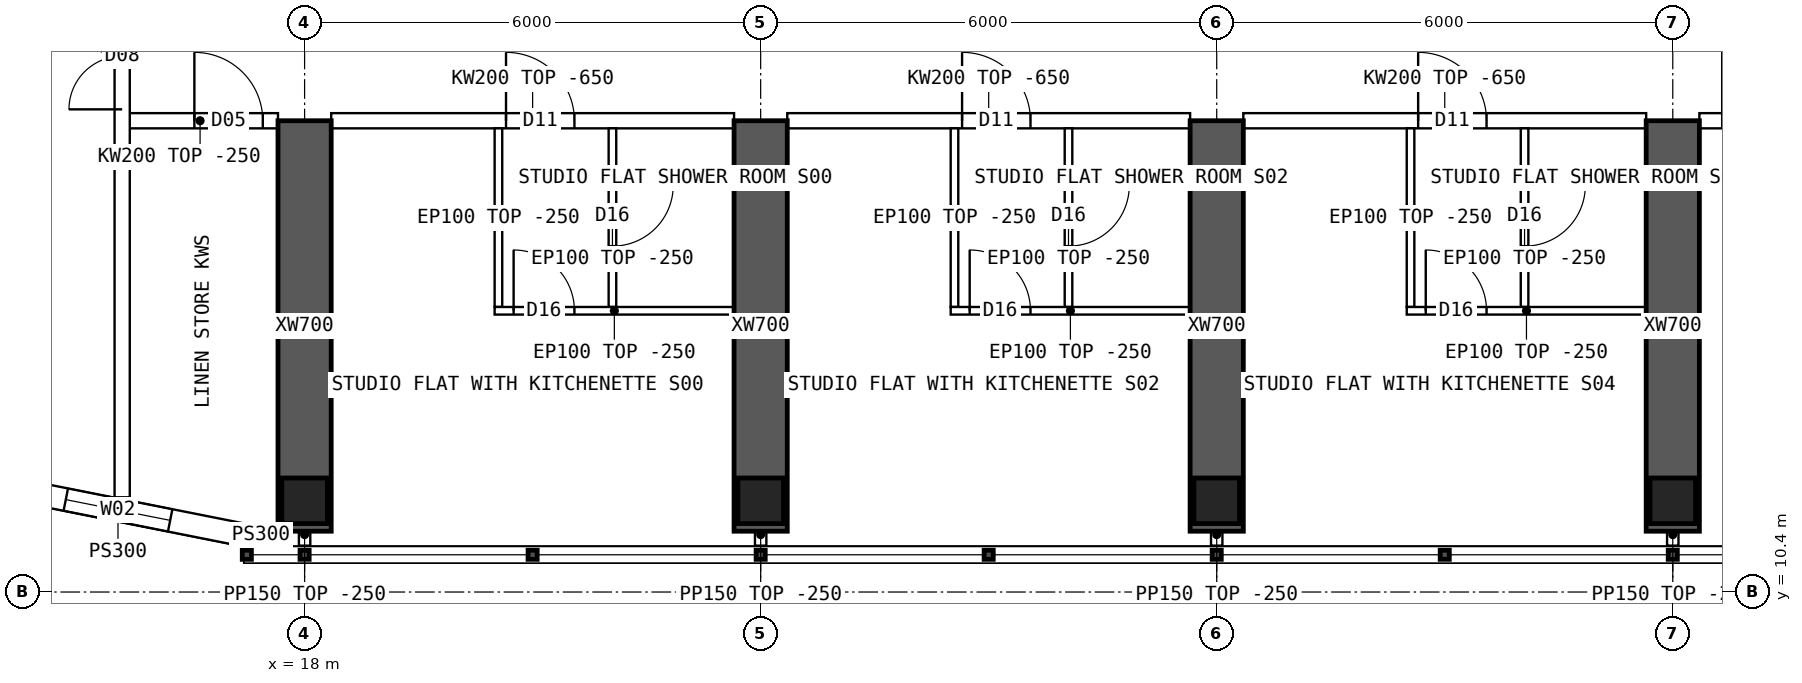
"""IFC4 building model, lengths in metres.
Left out: names, types, materials, properties, quantities, classifications, styles, units other than length and angle.
Written with IfcOpenShell. Run it as: python <this file> out.ifc"""

import sys

from ifc_helpers import new_model, si_unit, direction, frame, frame_2d, origin, origin_2d, place, context, subcontext, project, spatial, polyline, rectangle, hollow_rectangle, outline, extrude, element, fill, save


model = new_model("IFC4")
c1 = context("Model", 3, precision=1e-05, world=origin(), true_north=direction((0.0, 1.0)))
c2 = subcontext(c1, "Body", "Model", "MODEL_VIEW")
j1 = project(units=[si_unit("LENGTHUNIT", "METRE"), si_unit("PLANEANGLEUNIT", "RADIAN")], contexts=[c1])
p1 = place(None, origin())
s1 = spatial("IfcSite", under=j1, at=p1, CompositionType="ELEMENT")
p2 = place(p1, origin())
s2 = spatial("IfcBuilding", under=s1, at=p2, CompositionType="ELEMENT")
p3 = place(p2, frame((0.0, 0.0, 246.55)))
s3 = spatial("IfcBuildingStorey", under=s2, at=p3, CompositionType="ELEMENT", Elevation=246.55)
for number, where, z_axis, x_axis in (
    (1, (18.0, 11.6, 0.0), (0.0, 0.0, 1.0), (1.0, 0.0, 0.0)),
    (2, (24.0, 11.6, 0.0), (0.0, 0.0, 1.0), (1.0, 0.0, 0.0)),
    (3, (30.0, 11.6, 0.0), (0.0, 0.0, 1.0), (1.0, 0.0, 0.0)),
    (4, (36.0, 11.6, 0.0), (0.0, 0.0, 1.0), (1.0, 0.0, 0.0)),
):
    element("IfcColumn", number, at=place(p3, frame(where, z_axis=z_axis, x_axis=x_axis)), inside=s3, PredefinedType="COLUMN", context=c2, shape_type="SweptSolid", body=[
        extrude(hollow_rectangle(XDim=0.6, YDim=0.6, WallThickness=0.06, at=origin_2d()), origin(), (0.0, 0.0, 1.0), 3.75),
    ])
for number, where, z_axis, x_axis in (
    (5, (18.0, 11.2, 0.0), (0.0, 0.0, 1.0), (0.0, 1.0, 0.0)),
    (6, (24.0, 11.2, 0.0), (0.0, 0.0, 1.0), (0.0, 1.0, 0.0)),
    (7, (30.0, 11.2, 0.0), (0.0, 0.0, 1.0), (0.0, 1.0, 0.0)),
    (8, (36.0, 11.2, 0.0), (0.0, 0.0, 1.0), (0.0, 1.0, 0.0)),
):
    element("IfcWall", number, at=place(p3, frame(where, z_axis=z_axis, x_axis=x_axis)), inside=s3, PredefinedType="SHEAR", context=c2, shape_type="SweptSolid", body=[
        extrude(rectangle(XDim=5.4, YDim=0.7, at=frame_2d((2.7, 0.0))), origin(), (0.0, 0.0, 1.0), 3.75),
    ])
p4 = place(p3, frame((13.89, 11.808, 0.0), z_axis=(0.0, 0.0, 1.0), x_axis=(0.98078325777, -0.195100490205, 0.0)))
e9 = element("IfcWall", 9, at=p4, inside=s3, PredefinedType="SOLIDWALL", context=c2, shape_type="SweptSolid", body=[
    extrude(outline(polyline([(-0.03, -0.15), (3.405, -0.15), (3.345, 0.15), (0.03, 0.15), (-0.03, -0.15)])), origin(), (0.0, 0.0, 1.0), 3.5),
])
p5 = place(p4, frame((0.988, 0.0, 0.9)))
e10 = element("IfcOpeningElement", 10, at=p5, cuts=e9, PredefinedType="OPENING", context=c2, shape_type="SweptSolid", body=[
    extrude(rectangle(XDim=1.4, YDim=1.8, at=frame_2d((0.7, 0.9))), frame((0.0, 0.16, 0.0), z_axis=(0.0, -1.0, 0.0), x_axis=(1.0, 0.0, 0.0)), (0.0, 0.0, 1.0), 0.32),
])
p6 = place(p3, frame((17.2, 11.15, 0.0), z_axis=(0.0, 0.0, 1.0), x_axis=(1.0, 0.0, 0.0)))
e11 = element("IfcWall", 11, at=p6, inside=s3, PredefinedType="SOLIDWALL", context=c2, shape_type="SweptSolid", body=[
    extrude(rectangle(XDim=0.45, YDim=0.3, at=frame_2d((0.225, 0.0))), origin(), (0.0, 0.0, 1.0), 3.5),
])
p7 = place(p3, frame((15.6, 16.6, 0.0), z_axis=(0.0, 0.0, 1.0), x_axis=(1.0, 0.0, 0.0)))
e12 = element("IfcWall", 12, at=p7, inside=s3, PredefinedType="SOLIDWALL", context=c2, shape_type="SweptSolid", body=[
    extrude(rectangle(XDim=2.05, YDim=0.2, at=frame_2d((1.025, 0.0))), origin(), (0.0, 0.0, 1.0), 3.5),
])
p8 = place(p7, frame((0.95, 0.0, 0.0)))
e13 = element("IfcOpeningElement", 13, at=p8, cuts=e12, PredefinedType="OPENING", context=c2, shape_type="SweptSolid", body=[
    extrude(rectangle(XDim=0.9, YDim=2.1, at=frame_2d((0.45, 1.05))), frame((0.0, 0.11, 0.0), z_axis=(0.0, -1.0, 0.0), x_axis=(1.0, 0.0, 0.0)), (0.0, 0.0, 1.0), 0.22),
])
p9 = place(p3, frame((18.35, 16.6, 0.0), z_axis=(0.0, 0.0, 1.0), x_axis=(1.0, 0.0, 0.0)))
e14 = element("IfcWall", 14, at=p9, inside=s3, PredefinedType="SOLIDWALL", context=c2, shape_type="SweptSolid", body=[
    extrude(outline(polyline([(0.0, 0.0), (5.3, 0.0), (5.3, 3.1), (0.0, 3.1), (0.0, 0.0)])), frame((0.0, 0.1, 0.0), z_axis=(0.0, -1.0, 0.0), x_axis=(1.0, 0.0, 0.0)), (0.0, 0.0, 1.0), 0.2),
])
p10 = place(p9, frame((2.3, 0.0, 0.0)))
e15 = element("IfcOpeningElement", 15, at=p10, cuts=e14, PredefinedType="OPENING", context=c2, shape_type="SweptSolid", body=[
    extrude(rectangle(XDim=0.9, YDim=2.1, at=frame_2d((0.45, 1.05))), frame((0.0, 0.11, 0.0), z_axis=(0.0, -1.0, 0.0), x_axis=(1.0, 0.0, 0.0)), (0.0, 0.0, 1.0), 0.22),
])
p11 = place(p3, frame((24.35, 16.6, 0.0), z_axis=(0.0, 0.0, 1.0), x_axis=(1.0, 0.0, 0.0)))
e16 = element("IfcWall", 16, at=p11, inside=s3, PredefinedType="SOLIDWALL", context=c2, shape_type="SweptSolid", body=[
    extrude(outline(polyline([(0.0, 0.0), (5.3, 0.0), (5.3, 3.1), (0.0, 3.1), (0.0, 0.0)])), frame((0.0, 0.1, 0.0), z_axis=(0.0, -1.0, 0.0), x_axis=(1.0, 0.0, 0.0)), (0.0, 0.0, 1.0), 0.2),
])
p12 = place(p11, frame((2.3, 0.0, 0.0)))
e17 = element("IfcOpeningElement", 17, at=p12, cuts=e16, PredefinedType="OPENING", context=c2, shape_type="SweptSolid", body=[
    extrude(rectangle(XDim=0.9, YDim=2.1, at=frame_2d((0.45, 1.05))), frame((0.0, 0.11, 0.0), z_axis=(0.0, -1.0, 0.0), x_axis=(1.0, 0.0, 0.0)), (0.0, 0.0, 1.0), 0.22),
])
p13 = place(p3, frame((30.35, 16.6, 0.0), z_axis=(0.0, 0.0, 1.0), x_axis=(1.0, 0.0, 0.0)))
e18 = element("IfcWall", 18, at=p13, inside=s3, PredefinedType="SOLIDWALL", context=c2, shape_type="SweptSolid", body=[
    extrude(outline(polyline([(0.0, 0.0), (5.3, 0.0), (5.3, 3.1), (0.0, 3.1), (0.0, 0.0)])), frame((0.0, 0.1, 0.0), z_axis=(0.0, -1.0, 0.0), x_axis=(1.0, 0.0, 0.0)), (0.0, 0.0, 1.0), 0.2),
])
p14 = place(p13, frame((2.3, 0.0, 0.0)))
e19 = element("IfcOpeningElement", 19, at=p14, cuts=e18, PredefinedType="OPENING", context=c2, shape_type="SweptSolid", body=[
    extrude(rectangle(XDim=0.9, YDim=2.1, at=frame_2d((0.45, 1.05))), frame((0.0, 0.11, 0.0), z_axis=(0.0, -1.0, 0.0), x_axis=(1.0, 0.0, 0.0)), (0.0, 0.0, 1.0), 0.22),
])
p15 = place(p3, frame((36.35, 16.6, 0.0), z_axis=(0.0, 0.0, 1.0), x_axis=(1.0, 0.0, 0.0)))
e20 = element("IfcWall", 20, at=p15, inside=s3, PredefinedType="SOLIDWALL", context=c2, shape_type="SweptSolid", body=[
    extrude(outline(polyline([(0.0, 0.0), (5.3, 0.0), (5.3, 3.1), (0.0, 3.1), (0.0, 0.0)])), frame((0.0, 0.1, 0.0), z_axis=(0.0, -1.0, 0.0), x_axis=(1.0, 0.0, 0.0)), (0.0, 0.0, 1.0), 0.2),
])
p16 = place(p15, frame((0.3, 0.0, 0.0)))
e21 = element("IfcOpeningElement", 21, at=p16, cuts=e20, PredefinedType="OPENING", context=c2, shape_type="SweptSolid", body=[
    extrude(rectangle(XDim=1.0, YDim=2.1, at=frame_2d((0.5, 1.05))), frame((0.0, 0.11, 0.0), z_axis=(0.0, -1.0, 0.0), x_axis=(1.0, 0.0, 0.0)), (0.0, 0.0, 1.0), 0.22),
])
p17 = place(p3, frame((23.65, 14.1, 0.0), z_axis=(0.0, 0.0, 1.0), x_axis=(-1.0, 0.0, 0.0)))
e22 = element("IfcWall", 22, at=p17, inside=s3, PredefinedType="PARTITIONING", context=c2, shape_type="SweptSolid", body=[
    extrude(rectangle(XDim=3.15, YDim=0.1, at=frame_2d((1.575, 0.0))), origin(), (0.0, 0.0, 1.0), 3.5),
])
p18 = place(p17, frame((2.1, 0.0, 0.0)))
e23 = element("IfcOpeningElement", 23, at=p18, cuts=e22, PredefinedType="OPENING", context=c2, shape_type="SweptSolid", body=[
    extrude(rectangle(XDim=0.8, YDim=2.1, at=frame_2d((0.4, 1.05))), frame((0.0, 0.06, 0.0), z_axis=(0.0, -1.0, 0.0), x_axis=(1.0, 0.0, 0.0)), (0.0, 0.0, 1.0), 0.12),
])
p19 = place(p3, frame((20.55, 14.15, 0.0), z_axis=(0.0, 0.0, 1.0), x_axis=(0.0, 1.0, 0.0)))
e24 = element("IfcWall", 24, at=p19, inside=s3, PredefinedType="PARTITIONING", context=c2, shape_type="SweptSolid", body=[
    extrude(outline(polyline([(0.0, 0.0), (2.35, 0.0), (2.35, 3.1), (2.302, 3.1), (2.3, 3.5), (0.0, 3.5), (0.0, 0.0)])), frame((0.0, 0.05, 0.0), z_axis=(0.0, -1.0, 0.0), x_axis=(1.0, 0.0, 0.0)), (0.0, 0.0, 1.0), 0.1),
])
p20 = place(p3, frame((22.05, 14.15, 0.0), z_axis=(0.0, 0.0, 1.0), x_axis=(0.0, 1.0, 0.0)))
e25 = element("IfcWall", 25, at=p20, inside=s3, PredefinedType="PARTITIONING", context=c2, shape_type="SweptSolid", body=[
    extrude(outline(polyline([(0.0, 0.0), (2.35, 0.0), (2.35, 3.1), (2.302, 3.1), (2.3, 3.5), (0.0, 3.5), (0.0, 0.0)])), frame((0.0, 0.05, 0.0), z_axis=(0.0, -1.0, 0.0), x_axis=(1.0, 0.0, 0.0)), (0.0, 0.0, 1.0), 0.1),
])
p21 = place(p20, frame((0.8, 0.0, 0.0)))
e26 = element("IfcOpeningElement", 26, at=p21, cuts=e25, PredefinedType="OPENING", context=c2, shape_type="SweptSolid", body=[
    extrude(rectangle(XDim=0.8, YDim=2.1, at=frame_2d((0.4, 1.05))), frame((0.0, 0.06, 0.0), z_axis=(0.0, -1.0, 0.0), x_axis=(1.0, 0.0, 0.0)), (0.0, 0.0, 1.0), 0.12),
])
p22 = place(p3, frame((29.65, 14.1, 0.0), z_axis=(0.0, 0.0, 1.0), x_axis=(-1.0, 0.0, 0.0)))
e27 = element("IfcWall", 27, at=p22, inside=s3, PredefinedType="PARTITIONING", context=c2, shape_type="SweptSolid", body=[
    extrude(rectangle(XDim=3.15, YDim=0.1, at=frame_2d((1.575, 0.0))), origin(), (0.0, 0.0, 1.0), 3.5),
])
p23 = place(p22, frame((2.1, 0.0, 0.0)))
e28 = element("IfcOpeningElement", 28, at=p23, cuts=e27, PredefinedType="OPENING", context=c2, shape_type="SweptSolid", body=[
    extrude(rectangle(XDim=0.8, YDim=2.1, at=frame_2d((0.4, 1.05))), frame((0.0, 0.06, 0.0), z_axis=(0.0, -1.0, 0.0), x_axis=(1.0, 0.0, 0.0)), (0.0, 0.0, 1.0), 0.12),
])
p24 = place(p3, frame((26.55, 14.15, 0.0), z_axis=(0.0, 0.0, 1.0), x_axis=(0.0, 1.0, 0.0)))
e29 = element("IfcWall", 29, at=p24, inside=s3, PredefinedType="PARTITIONING", context=c2, shape_type="SweptSolid", body=[
    extrude(outline(polyline([(0.0, 0.0), (2.35, 0.0), (2.35, 3.1), (2.302, 3.1), (2.3, 3.5), (0.0, 3.5), (0.0, 0.0)])), frame((0.0, 0.05, 0.0), z_axis=(0.0, -1.0, 0.0), x_axis=(1.0, 0.0, 0.0)), (0.0, 0.0, 1.0), 0.1),
])
p25 = place(p3, frame((28.05, 14.15, 0.0), z_axis=(0.0, 0.0, 1.0), x_axis=(0.0, 1.0, 0.0)))
e30 = element("IfcWall", 30, at=p25, inside=s3, PredefinedType="PARTITIONING", context=c2, shape_type="SweptSolid", body=[
    extrude(outline(polyline([(0.0, 0.0), (2.35, 0.0), (2.35, 3.1), (2.302, 3.1), (2.3, 3.5), (0.0, 3.5), (0.0, 0.0)])), frame((0.0, 0.05, 0.0), z_axis=(0.0, -1.0, 0.0), x_axis=(1.0, 0.0, 0.0)), (0.0, 0.0, 1.0), 0.1),
])
p26 = place(p25, frame((0.8, 0.0, 0.0)))
e31 = element("IfcOpeningElement", 31, at=p26, cuts=e30, PredefinedType="OPENING", context=c2, shape_type="SweptSolid", body=[
    extrude(rectangle(XDim=0.8, YDim=2.1, at=frame_2d((0.4, 1.05))), frame((0.0, 0.06, 0.0), z_axis=(0.0, -1.0, 0.0), x_axis=(1.0, 0.0, 0.0)), (0.0, 0.0, 1.0), 0.12),
])
p27 = place(p3, frame((35.65, 14.1, 0.0), z_axis=(0.0, 0.0, 1.0), x_axis=(-1.0, 0.0, 0.0)))
e32 = element("IfcWall", 32, at=p27, inside=s3, PredefinedType="PARTITIONING", context=c2, shape_type="SweptSolid", body=[
    extrude(rectangle(XDim=3.15, YDim=0.1, at=frame_2d((1.575, 0.0))), origin(), (0.0, 0.0, 1.0), 3.5),
])
p28 = place(p27, frame((2.1, 0.0, 0.0)))
e33 = element("IfcOpeningElement", 33, at=p28, cuts=e32, PredefinedType="OPENING", context=c2, shape_type="SweptSolid", body=[
    extrude(rectangle(XDim=0.8, YDim=2.1, at=frame_2d((0.4, 1.05))), frame((0.0, 0.06, 0.0), z_axis=(0.0, -1.0, 0.0), x_axis=(1.0, 0.0, 0.0)), (0.0, 0.0, 1.0), 0.12),
])
p29 = place(p3, frame((32.55, 14.15, 0.0), z_axis=(0.0, 0.0, 1.0), x_axis=(0.0, 1.0, 0.0)))
e34 = element("IfcWall", 34, at=p29, inside=s3, PredefinedType="PARTITIONING", context=c2, shape_type="SweptSolid", body=[
    extrude(outline(polyline([(0.0, 0.0), (2.35, 0.0), (2.35, 3.1), (2.302, 3.1), (2.3, 3.5), (0.0, 3.5), (0.0, 0.0)])), frame((0.0, 0.05, 0.0), z_axis=(0.0, -1.0, 0.0), x_axis=(1.0, 0.0, 0.0)), (0.0, 0.0, 1.0), 0.1),
])
p30 = place(p3, frame((34.05, 14.15, 0.0), z_axis=(0.0, 0.0, 1.0), x_axis=(0.0, 1.0, 0.0)))
e35 = element("IfcWall", 35, at=p30, inside=s3, PredefinedType="PARTITIONING", context=c2, shape_type="SweptSolid", body=[
    extrude(outline(polyline([(0.0, 0.0), (2.35, 0.0), (2.35, 3.1), (2.302, 3.1), (2.3, 3.5), (0.0, 3.5), (0.0, 0.0)])), frame((0.0, 0.05, 0.0), z_axis=(0.0, -1.0, 0.0), x_axis=(1.0, 0.0, 0.0)), (0.0, 0.0, 1.0), 0.1),
])
p31 = place(p30, frame((0.8, 0.0, 0.0)))
e36 = element("IfcOpeningElement", 36, at=p31, cuts=e35, PredefinedType="OPENING", context=c2, shape_type="SweptSolid", body=[
    extrude(rectangle(XDim=0.8, YDim=2.1, at=frame_2d((0.4, 1.05))), frame((0.0, 0.06, 0.0), z_axis=(0.0, -1.0, 0.0), x_axis=(1.0, 0.0, 0.0)), (0.0, 0.0, 1.0), 0.12),
])
p32 = place(p3, frame((15.6, 11.646, 0.0), z_axis=(0.0, 0.0, 1.0), x_axis=(0.0, 1.0, 0.0)))
e37 = element("IfcWall", 37, at=p32, inside=s3, PredefinedType="SOLIDWALL", context=c2, shape_type="SweptSolid", body=[
    extrude(rectangle(XDim=40.708, YDim=0.2, at=frame_2d((20.354, 0.0))), origin(), (0.0, 0.0, 1.0), 3.5),
])
p33 = place(p32, frame((5.104, 0.0, 0.0)))
e38 = element("IfcOpeningElement", 38, at=p33, cuts=e37, PredefinedType="OPENING", context=c2, shape_type="SweptSolid", body=[
    extrude(rectangle(XDim=1.4, YDim=2.1, at=frame_2d((0.7, 1.05))), frame((0.0, 0.11, 0.0), z_axis=(0.0, -1.0, 0.0), x_axis=(1.0, 0.0, 0.0)), (0.0, 0.0, 1.0), 0.22),
])
p34 = place(p32, frame((34.104, 0.0, 0.0)))
e39 = element("IfcOpeningElement", 39, at=p34, cuts=e37, PredefinedType="OPENING", context=c2, shape_type="SweptSolid", body=[
    extrude(rectangle(XDim=1.4, YDim=2.1, at=frame_2d((0.7, 1.05))), frame((0.0, 0.11, 0.0), z_axis=(0.0, -1.0, 0.0), x_axis=(1.0, 0.0, 0.0)), (0.0, 0.0, 1.0), 0.22),
])
for number, where, z_axis, x_axis in (
    (40, (18.0, 11.3, 0.0), (0.0, 0.0, 1.0), (0.0, -1.0, 0.0)),
    (41, (24.0, 11.3, 0.0), (0.0, 0.0, 1.0), (0.0, -1.0, 0.0)),
    (42, (30.0, 11.3, 0.0), (0.0, 0.0, 1.0), (0.0, -1.0, 0.0)),
    (43, (36.0, 11.3, 0.0), (0.0, 0.0, 1.0), (0.0, -1.0, 0.0)),
):
    element("IfcWall", number, at=place(p3, frame(where, z_axis=z_axis, x_axis=x_axis)), inside=s3, PredefinedType="PARTITIONING", context=c2, shape_type="SweptSolid", body=[
        extrude(rectangle(XDim=0.29, YDim=0.15, at=frame_2d((0.145, 0.0))), origin(), (0.0, 0.0, 1.0), 3.5),
    ])
p35 = place(p5, origin())
e44 = element("IfcWindow", 44, at=p35, inside=s3, PartitioningType="SINGLE_PANEL", PredefinedType="WINDOW", context=c2, shape_type="SweptSolid", body=[
    extrude(rectangle(XDim=1.4, YDim=1.8, at=frame_2d((0.7, 0.9))), frame((0.0, 0.03, 0.0), z_axis=(0.0, -1.0, 0.0), x_axis=(1.0, 0.0, 0.0)), (0.0, 0.0, 1.0), 0.06),
])
fill(e10, e44)
p36 = place(p18, origin())
e45 = element("IfcDoor", 45, at=p36, inside=s3, OperationType="SINGLE_SWING_RIGHT", PredefinedType="DOOR", context=c2, shape_type="SweptSolid", body=[
    extrude(rectangle(XDim=0.8, YDim=2.1, at=frame_2d((0.4, 1.05))), frame((0.0, 0.025, 0.0), z_axis=(0.0, -1.0, 0.0), x_axis=(1.0, 0.0, 0.0)), (0.0, 0.0, 1.0), 0.05),
])
fill(e23, e45)
p37 = place(p21, origin())
e46 = element("IfcDoor", 46, at=p37, inside=s3, OperationType="SINGLE_SWING_RIGHT", PredefinedType="DOOR", context=c2, shape_type="SweptSolid", body=[
    extrude(rectangle(XDim=0.8, YDim=2.1, at=frame_2d((0.4, 1.05))), frame((0.0, 0.025, 0.0), z_axis=(0.0, -1.0, 0.0), x_axis=(1.0, 0.0, 0.0)), (0.0, 0.0, 1.0), 0.05),
])
fill(e26, e46)
p38 = place(p10, origin())
e47 = element("IfcDoor", 47, at=p38, inside=s3, OperationType="SINGLE_SWING_LEFT", PredefinedType="DOOR", context=c2, shape_type="SweptSolid", body=[
    extrude(rectangle(XDim=0.9, YDim=2.1, at=frame_2d((0.45, 1.05))), frame((0.0, 0.025, 0.0), z_axis=(0.0, -1.0, 0.0), x_axis=(1.0, 0.0, 0.0)), (0.0, 0.0, 1.0), 0.05),
])
fill(e15, e47)
p39 = place(p23, origin())
e48 = element("IfcDoor", 48, at=p39, inside=s3, OperationType="SINGLE_SWING_RIGHT", PredefinedType="DOOR", context=c2, shape_type="SweptSolid", body=[
    extrude(rectangle(XDim=0.8, YDim=2.1, at=frame_2d((0.4, 1.05))), frame((0.0, 0.025, 0.0), z_axis=(0.0, -1.0, 0.0), x_axis=(1.0, 0.0, 0.0)), (0.0, 0.0, 1.0), 0.05),
])
fill(e28, e48)
p40 = place(p26, origin())
e49 = element("IfcDoor", 49, at=p40, inside=s3, OperationType="SINGLE_SWING_RIGHT", PredefinedType="DOOR", context=c2, shape_type="SweptSolid", body=[
    extrude(rectangle(XDim=0.8, YDim=2.1, at=frame_2d((0.4, 1.05))), frame((0.0, 0.025, 0.0), z_axis=(0.0, -1.0, 0.0), x_axis=(1.0, 0.0, 0.0)), (0.0, 0.0, 1.0), 0.05),
])
fill(e31, e49)
p41 = place(p12, origin())
e50 = element("IfcDoor", 50, at=p41, inside=s3, OperationType="SINGLE_SWING_LEFT", PredefinedType="DOOR", context=c2, shape_type="SweptSolid", body=[
    extrude(rectangle(XDim=0.9, YDim=2.1, at=frame_2d((0.45, 1.05))), frame((0.0, 0.025, 0.0), z_axis=(0.0, -1.0, 0.0), x_axis=(1.0, 0.0, 0.0)), (0.0, 0.0, 1.0), 0.05),
])
fill(e17, e50)
p42 = place(p28, origin())
e51 = element("IfcDoor", 51, at=p42, inside=s3, OperationType="SINGLE_SWING_RIGHT", PredefinedType="DOOR", context=c2, shape_type="SweptSolid", body=[
    extrude(rectangle(XDim=0.8, YDim=2.1, at=frame_2d((0.4, 1.05))), frame((0.0, 0.025, 0.0), z_axis=(0.0, -1.0, 0.0), x_axis=(1.0, 0.0, 0.0)), (0.0, 0.0, 1.0), 0.05),
])
fill(e33, e51)
p43 = place(p31, origin())
e52 = element("IfcDoor", 52, at=p43, inside=s3, OperationType="SINGLE_SWING_RIGHT", PredefinedType="DOOR", context=c2, shape_type="SweptSolid", body=[
    extrude(rectangle(XDim=0.8, YDim=2.1, at=frame_2d((0.4, 1.05))), frame((0.0, 0.025, 0.0), z_axis=(0.0, -1.0, 0.0), x_axis=(1.0, 0.0, 0.0)), (0.0, 0.0, 1.0), 0.05),
])
fill(e36, e52)
p44 = place(p14, origin())
e53 = element("IfcDoor", 53, at=p44, inside=s3, OperationType="SINGLE_SWING_LEFT", PredefinedType="DOOR", context=c2, shape_type="SweptSolid", body=[
    extrude(rectangle(XDim=0.9, YDim=2.1, at=frame_2d((0.45, 1.05))), frame((0.0, 0.025, 0.0), z_axis=(0.0, -1.0, 0.0), x_axis=(1.0, 0.0, 0.0)), (0.0, 0.0, 1.0), 0.05),
])
fill(e19, e53)
p45 = place(p33, origin())
e54 = element("IfcDoor", 54, at=p45, inside=s3, OperationType="DOUBLE_DOOR_SINGLE_SWING", PredefinedType="DOOR", context=c2, shape_type="SweptSolid", body=[
    extrude(rectangle(XDim=1.4, YDim=2.1, at=frame_2d((0.7, 1.05))), frame((0.0, 0.025, 0.0), z_axis=(0.0, -1.0, 0.0), x_axis=(1.0, 0.0, 0.0)), (0.0, 0.0, 1.0), 0.05),
])
fill(e38, e54)
p46 = place(p8, origin())
e55 = element("IfcDoor", 55, at=p46, inside=s3, OperationType="SINGLE_SWING_LEFT", PredefinedType="DOOR", context=c2, shape_type="SweptSolid", body=[
    extrude(rectangle(XDim=0.9, YDim=2.1, at=frame_2d((0.45, 1.05))), frame((0.0, 0.025, 0.0), z_axis=(0.0, -1.0, 0.0), x_axis=(1.0, 0.0, 0.0)), (0.0, 0.0, 1.0), 0.05),
])
fill(e13, e55)
save(model, sys.argv[1])
